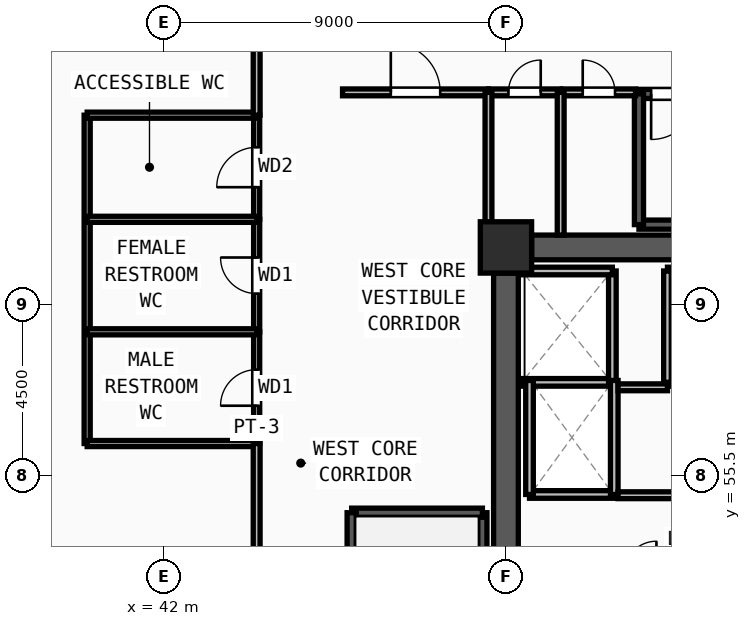
"""IFC4 building model, lengths in metres.
Left out: names, types, materials, properties, quantities, classifications, styles, units other than length and angle.
Written with IfcOpenShell. Run it as: python <this file> out.ifc"""

import sys

from ifc_helpers import new_model, si_unit, direction, frame, frame_2d, origin, origin_2d, place, context, subcontext, project, spatial, rectangle, extrude, source, transform, mapped, element, fill, save


model = new_model("IFC4")
c1 = context("Model", 3, precision=1e-05, world=origin(), true_north=direction((0.0, 1.0)))
c2 = subcontext(c1, "Body", "Model", "MODEL_VIEW")
j1 = project(units=[si_unit("LENGTHUNIT", "METRE"), si_unit("PLANEANGLEUNIT", "RADIAN")], contexts=[c1])
p1 = place(None, origin())
s1 = spatial("IfcSite", under=j1, at=p1, CompositionType="ELEMENT")
p2 = place(p1, origin())
s2 = spatial("IfcBuilding", under=s1, at=p2, CompositionType="ELEMENT")
p3 = place(p2, frame((0.0, 0.0, 213.0)))
s3 = spatial("IfcBuildingStorey", under=s2, at=p3, CompositionType="ELEMENT", Elevation=213.0)
m1 = source(origin(), c2, "Body", "SweptSolid", [
    extrude(rectangle(XDim=1.35, YDim=1.35, at=origin_2d()), origin(), (0.0, 0.0, 1.0), 3.75),
])
p4 = place(p3, frame((51.0, 61.5, 0.0), z_axis=(0.0, 0.0, 1.0), x_axis=(1.0, 0.0, 0.0)))
e1 = element("IfcColumn", 1, at=p4, inside=s3, PredefinedType="COLUMN", context=c2, shape_type="MappedRepresentation", body=[
    mapped(m1, transform((0.0, 0.0, 0.0), x_axis=(1.0, 0.0, 0.0), y_axis=(0.0, 1.0, 0.0), z_axis=(0.0, 0.0, 1.0), scale=1.0)),
])
p5 = place(p3, frame((51.675, 61.5, 0.0), z_axis=(0.0, 0.0, 1.0), x_axis=(1.0, 0.0, 0.0)))
e2 = element("IfcWall", 2, at=p5, inside=s3, PredefinedType="SHEAR", context=c2, shape_type="SweptSolid", body=[
    extrude(rectangle(XDim=7.65, YDim=0.65, at=frame_2d((3.825, 0.0))), origin(), (0.0, 0.0, 1.0), 3.57),
])
p6 = place(p3, frame((51.0, 47.175, 0.0), z_axis=(0.0, 0.0, 1.0), x_axis=(0.0, 1.0, 0.0)))
e3 = element("IfcWall", 3, at=p6, inside=s3, PredefinedType="SHEAR", context=c2, shape_type="SweptSolid", body=[
    extrude(rectangle(XDim=13.65, YDim=0.65, at=frame_2d((6.825, 0.0))), origin(), (0.0, 0.0, 1.0), 3.57),
])
p7 = place(p3, frame((50.38, 46.7, 0.0), z_axis=(0.0, 0.0, 1.0), x_axis=(0.0, 1.0, 0.0)))
e4 = element("IfcWall", 4, at=p7, inside=s3, PredefinedType="SOLIDWALL", context=c2, shape_type="SweptSolid", body=[
    extrude(rectangle(XDim=7.82, YDim=0.24, at=frame_2d((3.91, 0.0))), origin(), (0.0, 0.0, 1.0), 3.57),
])
p8 = place(p3, frame((50.38, 54.52, 0.0), z_axis=(0.0, 0.0, 1.0), x_axis=(-1.0, 0.0, 0.0)))
e5 = element("IfcWall", 5, at=p8, inside=s3, PredefinedType="SOLIDWALL", context=c2, shape_type="SweptSolid", body=[
    extrude(rectangle(XDim=3.44, YDim=0.24, at=frame_2d((1.72, 0.0))), origin(), (0.0, 0.0, 1.0), 3.57),
])
p9 = place(p3, frame((46.94, 54.52, 0.0), z_axis=(0.0, 0.0, 1.0), x_axis=(0.0, -1.0, 0.0)))
e6 = element("IfcWall", 6, at=p9, inside=s3, PredefinedType="SOLIDWALL", context=c2, shape_type="SweptSolid", body=[
    extrude(rectangle(XDim=7.82, YDim=0.24, at=frame_2d((3.91, 0.0))), origin(), (0.0, 0.0, 1.0), 3.57),
])
m2 = source(origin(), c2, "Body", "SweptSolid", [
    extrude(rectangle(XDim=1.2, YDim=2.2, at=frame_2d((0.6, 1.1))), frame((0.0, 0.13, 0.0), z_axis=(0.0, -1.0, 0.0), x_axis=(1.0, 0.0, 0.0)), (0.0, 0.0, 1.0), 0.26),
])
p10 = place(p9, frame((6.3, 0.0, 0.0)))
e7 = element("IfcOpeningElement", 7, at=p10, cuts=e6, PredefinedType="OPENING", context=c2, shape_type="MappedRepresentation", body=[
    mapped(m2, transform((0.0, 0.0, 0.0), x_axis=(1.0, 0.0, 0.0), y_axis=(0.0, 1.0, 0.0), z_axis=(0.0, 0.0, 1.0), scale=1.0)),
])
p11 = place(p3, frame((54.5, 62.1, 0.0), z_axis=(0.0, 0.0, 1.0), x_axis=(1.0, 0.0, 0.0)))
e8 = element("IfcWall", 8, at=p11, inside=s3, PredefinedType="SOLIDWALL", context=c2, shape_type="SweptSolid", body=[
    extrude(rectangle(XDim=7.82, YDim=0.24, at=frame_2d((3.91, 0.0))), origin(), (0.0, 0.0, 1.0), 3.57),
])
p12 = place(p3, frame((62.32, 65.54, 0.0), z_axis=(0.0, 0.0, 1.0), x_axis=(-1.0, 0.0, 0.0)))
e9 = element("IfcWall", 9, at=p12, inside=s3, PredefinedType="SOLIDWALL", context=c2, shape_type="SweptSolid", body=[
    extrude(rectangle(XDim=7.82, YDim=0.24, at=frame_2d((3.91, 0.0))), origin(), (0.0, 0.0, 1.0), 3.57),
])
p13 = place(p12, frame((6.3, 0.0, 0.0)))
e10 = element("IfcOpeningElement", 10, at=p13, cuts=e9, PredefinedType="OPENING", context=c2, shape_type="MappedRepresentation", body=[
    mapped(m2, transform((0.0, 0.0, 0.0), x_axis=(1.0, 0.0, 0.0), y_axis=(0.0, 1.0, 0.0), z_axis=(0.0, 0.0, 1.0), scale=1.0)),
])
p14 = place(p3, frame((54.5, 65.54, 0.0), z_axis=(0.0, 0.0, 1.0), x_axis=(0.0, -1.0, 0.0)))
e11 = element("IfcWall", 11, at=p14, inside=s3, PredefinedType="SOLIDWALL", context=c2, shape_type="SweptSolid", body=[
    extrude(rectangle(XDim=3.44, YDim=0.24, at=frame_2d((1.72, 0.0))), origin(), (0.0, 0.0, 1.0), 3.57),
])
for number, where, z_axis, x_axis in (
    (12, (55.25, 57.95, 0.0), (0.0, 0.0, 1.0), (1.0, 0.0, 0.0)),
    (13, (57.65, 60.88, 0.0), (0.0, 0.0, 1.0), (-1.0, 0.0, 0.0)),
):
    element("IfcWall", number, at=place(p3, frame(where, z_axis=z_axis, x_axis=x_axis)), inside=s3, PredefinedType="SOLIDWALL", context=c2, shape_type="SweptSolid", body=[
        extrude(rectangle(XDim=2.4, YDim=0.2, at=frame_2d((1.2, 0.0))), origin(), (0.0, 0.0, 1.0), 3.57),
    ])
p15 = place(p3, frame((55.25, 60.88, 0.0), z_axis=(0.0, 0.0, 1.0), x_axis=(0.0, -1.0, 0.0)))
e14 = element("IfcWall", 14, at=p15, inside=s3, PredefinedType="SOLIDWALL", context=c2, shape_type="SweptSolid", body=[
    extrude(rectangle(XDim=2.93, YDim=0.2, at=frame_2d((1.465, 0.0))), origin(), (0.0, 0.0, 1.0), 3.57),
])
p16 = place(p3, frame((51.4, 57.95, 0.0), z_axis=(0.0, 0.0, 1.0), x_axis=(1.0, 0.0, 0.0)))
e15 = element("IfcWall", 15, at=p16, inside=s3, PredefinedType="SOLIDWALL", context=c2, shape_type="SweptSolid", body=[
    extrude(rectangle(XDim=2.4, YDim=0.2, at=frame_2d((1.2, 0.0))), origin(), (0.0, 0.0, 1.0), 3.57),
])
p17 = place(p3, frame((53.8, 57.95, 0.0), z_axis=(0.0, 0.0, 1.0), x_axis=(0.0, 1.0, 0.0)))
e16 = element("IfcWall", 16, at=p17, inside=s3, PredefinedType="SOLIDWALL", context=c2, shape_type="SweptSolid", body=[
    extrude(rectangle(XDim=2.93, YDim=0.2, at=frame_2d((1.465, 0.0))), origin(), (0.0, 0.0, 1.0), 3.57),
])
p18 = place(p3, frame((53.8, 60.88, 0.0), z_axis=(0.0, 0.0, 1.0), x_axis=(-1.0, 0.0, 0.0)))
e17 = element("IfcWall", 17, at=p18, inside=s3, PredefinedType="SOLIDWALL", context=c2, shape_type="SweptSolid", body=[
    extrude(rectangle(XDim=2.4, YDim=0.2, at=frame_2d((1.2, 0.0))), origin(), (0.0, 0.0, 1.0), 3.57),
])
p19 = place(p3, frame((51.62, 55.0, 0.0), z_axis=(0.0, 0.0, 1.0), x_axis=(1.0, 0.0, 0.0)))
e18 = element("IfcWall", 18, at=p19, inside=s3, PredefinedType="SOLIDWALL", context=c2, shape_type="SweptSolid", body=[
    extrude(rectangle(XDim=2.23, YDim=0.2, at=frame_2d((1.115, 0.0))), origin(), (0.0, 0.0, 1.0), 3.57),
])
for number, where, z_axis, x_axis in (
    (19, (53.85, 55.0, 0.0), (0.0, 0.0, 1.0), (0.0, 1.0, 0.0)),
    (20, (51.62, 58.0, 0.0), (0.0, 0.0, 1.0), (0.0, -1.0, 0.0)),
):
    element("IfcWall", number, at=place(p3, frame(where, z_axis=z_axis, x_axis=x_axis)), inside=s3, PredefinedType="SOLIDWALL", context=c2, shape_type="SweptSolid", body=[
        extrude(rectangle(XDim=3.0, YDim=0.2, at=frame_2d((1.5, 0.0))), origin(), (0.0, 0.0, 1.0), 3.57),
    ])
p20 = place(p3, frame((53.95, 54.98, 0.0), z_axis=(0.0, 0.0, 1.0), x_axis=(1.0, 0.0, 0.0)))
e21 = element("IfcWall", 21, at=p20, inside=s3, PredefinedType="PARTITIONING", context=c2, shape_type="SweptSolid", body=[
    extrude(rectangle(XDim=4.21, YDim=0.18, at=frame_2d((2.105, 0.0))), origin(), (0.0, 0.0, 1.0), 3.57),
])
m3 = source(origin(), c2, "Body", "SweptSolid", [
    extrude(rectangle(XDim=1.0, YDim=2.2, at=frame_2d((0.5, 1.1))), frame((0.0, 0.1, 0.0), z_axis=(0.0, -1.0, 0.0), x_axis=(1.0, 0.0, 0.0)), (0.0, 0.0, 1.0), 0.2),
])
p21 = place(p20, frame((1.6, 0.0, 0.0)))
e22 = element("IfcOpeningElement", 22, at=p21, cuts=e21, PredefinedType="OPENING", context=c2, shape_type="MappedRepresentation", body=[
    mapped(m3, transform((0.0, 0.0, 0.0), x_axis=(1.0, 0.0, 0.0), y_axis=(0.0, 1.0, 0.0), z_axis=(0.0, 0.0, 1.0), scale=1.0)),
])
p22 = place(p3, frame((44.44, 56.34, 0.0), z_axis=(0.0, 0.0, 1.0), x_axis=(0.0, 1.0, 0.0)))
e23 = element("IfcWall", 23, at=p22, inside=s3, PredefinedType="PARTITIONING", context=c2, shape_type="SweptSolid", body=[
    extrude(rectangle(XDim=2.94, YDim=0.16, at=frame_2d((1.47, 0.0))), origin(), (0.0, 0.0, 1.0), 3.57),
])
m4 = source(origin(), c2, "Body", "SweptSolid", [
    extrude(rectangle(XDim=0.95, YDim=2.15, at=frame_2d((0.475, 1.075))), frame((0.0, 0.09, 0.0), z_axis=(0.0, -1.0, 0.0), x_axis=(1.0, 0.0, 0.0)), (0.0, 0.0, 1.0), 0.18),
])
p23 = place(p22, frame((0.995, 0.0, 0.0)))
e24 = element("IfcOpeningElement", 24, at=p23, cuts=e23, PredefinedType="OPENING", context=c2, shape_type="MappedRepresentation", body=[
    mapped(m4, transform((0.0, 0.0, 0.0), x_axis=(1.0, 0.0, 0.0), y_axis=(0.0, 1.0, 0.0), z_axis=(0.0, 0.0, 1.0), scale=1.0)),
])
p24 = place(p3, frame((44.44, 59.28, 0.0), z_axis=(0.0, 0.0, 1.0), x_axis=(0.0, 1.0, 0.0)))
e25 = element("IfcWall", 25, at=p24, inside=s3, PredefinedType="PARTITIONING", context=c2, shape_type="SweptSolid", body=[
    extrude(rectangle(XDim=2.96, YDim=0.16, at=frame_2d((1.48, 0.0))), origin(), (0.0, 0.0, 1.0), 3.57),
])
p25 = place(p24, frame((1.005, 0.0, 0.0)))
e26 = element("IfcOpeningElement", 26, at=p25, cuts=e25, PredefinedType="OPENING", context=c2, shape_type="MappedRepresentation", body=[
    mapped(m4, transform((0.0, 0.0, 0.0), x_axis=(1.0, 0.0, 0.0), y_axis=(0.0, 1.0, 0.0), z_axis=(0.0, 0.0, 1.0), scale=1.0)),
])
p26 = place(p3, frame((44.44, 62.24, 0.0), z_axis=(0.0, 0.0, 1.0), x_axis=(0.0, 1.0, 0.0)))
e27 = element("IfcWall", 27, at=p26, inside=s3, PredefinedType="PARTITIONING", context=c2, shape_type="SweptSolid", body=[
    extrude(rectangle(XDim=2.74, YDim=0.16, at=frame_2d((1.37, 0.0))), origin(), (0.0, 0.0, 1.0), 3.57),
])
m5 = source(origin(), c2, "Body", "SweptSolid", [
    extrude(rectangle(XDim=1.05, YDim=2.15, at=frame_2d((0.525, 1.075))), frame((0.0, 0.09, 0.0), z_axis=(0.0, -1.0, 0.0), x_axis=(1.0, 0.0, 0.0)), (0.0, 0.0, 1.0), 0.18),
])
p27 = place(p26, frame((0.845, 0.0, 0.0)))
e28 = element("IfcOpeningElement", 28, at=p27, cuts=e27, PredefinedType="OPENING", context=c2, shape_type="MappedRepresentation", body=[
    mapped(m5, transform((0.0, 0.0, 0.0), x_axis=(1.0, 0.0, 0.0), y_axis=(0.0, 1.0, 0.0), z_axis=(0.0, 0.0, 1.0), scale=1.0)),
])
p28 = place(p3, frame((50.54, 65.58, 0.0), z_axis=(0.0, 0.0, 1.0), x_axis=(1.0, 0.0, 0.0)))
e29 = element("IfcWall", 29, at=p28, inside=s3, PredefinedType="PARTITIONING", context=c2, shape_type="SweptSolid", body=[
    extrude(rectangle(XDim=1.9, YDim=0.18, at=frame_2d((0.95, 0.0))), origin(), (0.0, 0.0, 1.0), 3.57),
])
m6 = source(origin(), c2, "Body", "SweptSolid", [
    extrude(rectangle(XDim=0.85, YDim=2.1, at=frame_2d((0.425, 1.05))), frame((0.0, 0.1, 0.0), z_axis=(0.0, -1.0, 0.0), x_axis=(1.0, 0.0, 0.0)), (0.0, 0.0, 1.0), 0.2),
])
p29 = place(p28, frame((0.525, 0.0, 0.0)))
e30 = element("IfcOpeningElement", 30, at=p29, cuts=e29, PredefinedType="OPENING", context=c2, shape_type="MappedRepresentation", body=[
    mapped(m6, transform((0.0, 0.0, 0.0), x_axis=(1.0, 0.0, 0.0), y_axis=(0.0, 1.0, 0.0), z_axis=(0.0, 0.0, 1.0), scale=1.0)),
])
p30 = place(p3, frame((52.48, 65.58, 0.0), z_axis=(0.0, 0.0, 1.0), x_axis=(1.0, 0.0, 0.0)))
e31 = element("IfcWall", 31, at=p30, inside=s3, PredefinedType="PARTITIONING", context=c2, shape_type="SweptSolid", body=[
    extrude(rectangle(XDim=1.93, YDim=0.18, at=frame_2d((0.965, 0.0))), origin(), (0.0, 0.0, 1.0), 3.57),
])
p31 = place(p30, frame((0.54, 0.0, 0.0)))
e32 = element("IfcOpeningElement", 32, at=p31, cuts=e31, PredefinedType="OPENING", context=c2, shape_type="MappedRepresentation", body=[
    mapped(m6, transform((0.0, 0.0, 0.0), x_axis=(1.0, 0.0, 0.0), y_axis=(0.0, 1.0, 0.0), z_axis=(0.0, 0.0, 1.0), scale=1.0)),
])
p32 = place(p3, frame((46.7, 65.58, 0.0), z_axis=(0.0, 0.0, 1.0), x_axis=(1.0, 0.0, 0.0)))
e33 = element("IfcWall", 33, at=p32, inside=s3, PredefinedType="PARTITIONING", context=c2, shape_type="SweptSolid", body=[
    extrude(rectangle(XDim=3.84, YDim=0.18, at=frame_2d((1.92, 0.0))), origin(), (0.0, 0.0, 1.0), 3.57),
])
m7 = source(origin(), c2, "Body", "SweptSolid", [
    extrude(rectangle(XDim=1.3, YDim=2.2, at=frame_2d((0.65, 1.1))), frame((0.0, 0.1, 0.0), z_axis=(0.0, -1.0, 0.0), x_axis=(1.0, 0.0, 0.0)), (0.0, 0.0, 1.0), 0.2),
])
p33 = place(p32, frame((1.27, 0.0, 0.0)))
e34 = element("IfcOpeningElement", 34, at=p33, cuts=e33, PredefinedType="OPENING", context=c2, shape_type="MappedRepresentation", body=[
    mapped(m7, transform((0.0, 0.0, 0.0), x_axis=(1.0, 0.0, 0.0), y_axis=(0.0, 1.0, 0.0), z_axis=(0.0, 0.0, 1.0), scale=1.0)),
])
p34 = place(p3, frame((39.98, 56.34, 0.0), z_axis=(0.0, 0.0, 1.0), x_axis=(0.0, 1.0, 0.0)))
e35 = element("IfcWall", 35, at=p34, inside=s3, PredefinedType="PARTITIONING", context=c2, shape_type="SweptSolid", body=[
    extrude(rectangle(XDim=8.64, YDim=0.16, at=frame_2d((4.32, 0.0))), origin(), (0.0, 0.0, 1.0), 3.57),
])
for number, where, z_axis, x_axis in (
    (36, (39.98, 56.34, 0.0), (0.0, 0.0, 1.0), (1.0, 0.0, 0.0)),
    (37, (39.98, 59.28, 0.0), (0.0, 0.0, 1.0), (1.0, 0.0, 0.0)),
    (38, (39.98, 62.24, 0.0), (0.0, 0.0, 1.0), (1.0, 0.0, 0.0)),
    (39, (39.98, 64.98, 0.0), (0.0, 0.0, 1.0), (1.0, 0.0, 0.0)),
):
    element("IfcWall", number, at=place(p3, frame(where, z_axis=z_axis, x_axis=x_axis)), inside=s3, PredefinedType="PARTITIONING", context=c2, shape_type="SweptSolid", body=[
        extrude(rectangle(XDim=4.46, YDim=0.16, at=frame_2d((2.23, 0.0))), origin(), (0.0, 0.0, 1.0), 3.57),
    ])
p35 = place(p3, frame((50.54, 61.95, 0.0), z_axis=(0.0, 0.0, 1.0), x_axis=(0.0, 1.0, 0.0)))
e40 = element("IfcWall", 40, at=p35, inside=s3, PredefinedType="PARTITIONING", context=c2, shape_type="SweptSolid", body=[
    extrude(rectangle(XDim=3.63, YDim=0.18, at=frame_2d((1.815, 0.0))), origin(), (0.0, 0.0, 1.0), 3.57),
])
p36 = place(p3, frame((52.44, 61.825, 0.0), z_axis=(0.0, 0.0, 1.0), x_axis=(0.0, 1.0, 0.0)))
e41 = element("IfcWall", 41, at=p36, inside=s3, PredefinedType="PARTITIONING", context=c2, shape_type="SweptSolid", body=[
    extrude(rectangle(XDim=3.755, YDim=0.18, at=frame_2d((1.877, 0.0))), origin(), (0.0, 0.0, 1.0), 3.57),
])
p37 = place(p3, frame((44.44, 50.39, 0.0), z_axis=(0.0, 0.0, 1.0), x_axis=(0.0, 1.0, 0.0)))
e42 = element("IfcWall", 42, at=p37, inside=s3, PredefinedType="PARTITIONING", context=c2, shape_type="SweptSolid", body=[
    extrude(rectangle(XDim=5.95, YDim=0.18, at=frame_2d((2.975, 0.0))), origin(), (0.0, 0.0, 1.0), 3.57),
])
p38 = place(p3, frame((44.44, 64.98, 0.0), z_axis=(0.0, 0.0, 1.0), x_axis=(0.0, 1.0, 0.0)))
e43 = element("IfcWall", 43, at=p38, inside=s3, PredefinedType="PARTITIONING", context=c2, shape_type="SweptSolid", body=[
    extrude(rectangle(XDim=1.805, YDim=0.18, at=frame_2d((0.902, 0.0))), origin(), (0.0, 0.0, 1.0), 3.57),
])
p39 = place(p3, frame((53.95, 57.82, 0.0), z_axis=(0.0, 0.0, 1.0), x_axis=(1.0, 0.0, 0.0)))
e44 = element("IfcWall", 44, at=p39, inside=s3, PredefinedType="PARTITIONING", context=c2, shape_type="SweptSolid", body=[
    extrude(rectangle(XDim=1.3, YDim=0.18, at=frame_2d((0.65, 0.0))), origin(), (0.0, 0.0, 1.0), 3.57),
])
m8 = source(origin(), c2, "Body", "SweptSolid", [
    extrude(rectangle(XDim=1.2, YDim=2.2, at=frame_2d((0.6, 1.1))), frame((0.0, 0.025, 0.0), z_axis=(0.0, -1.0, 0.0), x_axis=(1.0, 0.0, 0.0)), (0.0, 0.0, 1.0), 0.05),
])
p40 = place(p13, origin())
e45 = element("IfcDoor", 45, at=p40, inside=s3, OperationType="SINGLE_SWING_RIGHT", PredefinedType="DOOR", context=c2, shape_type="MappedRepresentation", body=[
    mapped(m8, transform((0.0, 0.0, 0.0), x_axis=(1.0, 0.0, 0.0), y_axis=(0.0, 1.0, 0.0), z_axis=(0.0, 0.0, 1.0), scale=1.0)),
])
fill(e10, e45)
m9 = source(origin(), c2, "Body", "SweptSolid", [
    extrude(rectangle(XDim=0.95, YDim=2.15, at=frame_2d((0.475, 1.075))), frame((0.0, 0.025, 0.0), z_axis=(0.0, -1.0, 0.0), x_axis=(1.0, 0.0, 0.0)), (0.0, 0.0, 1.0), 0.05),
])
p41 = place(p23, origin())
e46 = element("IfcDoor", 46, at=p41, inside=s3, OperationType="SINGLE_SWING_LEFT", PredefinedType="DOOR", context=c2, shape_type="MappedRepresentation", body=[
    mapped(m9, transform((0.0, 0.0, 0.0), x_axis=(1.0, 0.0, 0.0), y_axis=(0.0, 1.0, 0.0), z_axis=(0.0, 0.0, 1.0), scale=1.0)),
])
fill(e24, e46)
p42 = place(p25, origin())
e47 = element("IfcDoor", 47, at=p42, inside=s3, OperationType="SINGLE_SWING_RIGHT", PredefinedType="DOOR", context=c2, shape_type="MappedRepresentation", body=[
    mapped(m9, transform((0.0, 0.0, 0.0), x_axis=(1.0, 0.0, 0.0), y_axis=(0.0, 1.0, 0.0), z_axis=(0.0, 0.0, 1.0), scale=1.0)),
])
fill(e26, e47)
m10 = source(origin(), c2, "Body", "SweptSolid", [
    extrude(rectangle(XDim=1.05, YDim=2.15, at=frame_2d((0.525, 1.075))), frame((0.0, 0.025, 0.0), z_axis=(0.0, -1.0, 0.0), x_axis=(1.0, 0.0, 0.0)), (0.0, 0.0, 1.0), 0.05),
])
p43 = place(p27, origin())
e48 = element("IfcDoor", 48, at=p43, inside=s3, OperationType="SINGLE_SWING_LEFT", PredefinedType="DOOR", context=c2, shape_type="MappedRepresentation", body=[
    mapped(m10, transform((0.0, 0.0, 0.0), x_axis=(1.0, 0.0, 0.0), y_axis=(0.0, 1.0, 0.0), z_axis=(0.0, 0.0, 1.0), scale=1.0)),
])
fill(e28, e48)
m11 = source(origin(), c2, "Body", "SweptSolid", [
    extrude(rectangle(XDim=0.85, YDim=2.1, at=frame_2d((0.425, 1.05))), frame((0.0, 0.025, 0.0), z_axis=(0.0, -1.0, 0.0), x_axis=(1.0, 0.0, 0.0)), (0.0, 0.0, 1.0), 0.05),
])
p44 = place(p29, origin())
e49 = element("IfcDoor", 49, at=p44, inside=s3, OperationType="SINGLE_SWING_RIGHT", PredefinedType="DOOR", context=c2, shape_type="MappedRepresentation", body=[
    mapped(m11, transform((0.0, 0.0, 0.0), x_axis=(1.0, 0.0, 0.0), y_axis=(0.0, 1.0, 0.0), z_axis=(0.0, 0.0, 1.0), scale=1.0)),
])
fill(e30, e49)
p45 = place(p31, origin())
e50 = element("IfcDoor", 50, at=p45, inside=s3, OperationType="SINGLE_SWING_LEFT", PredefinedType="DOOR", context=c2, shape_type="MappedRepresentation", body=[
    mapped(m11, transform((0.0, 0.0, 0.0), x_axis=(1.0, 0.0, 0.0), y_axis=(0.0, 1.0, 0.0), z_axis=(0.0, 0.0, 1.0), scale=1.0)),
])
fill(e32, e50)
m12 = source(origin(), c2, "Body", "SweptSolid", [
    extrude(rectangle(XDim=1.3, YDim=2.2, at=frame_2d((0.65, 1.1))), frame((0.0, 0.025, 0.0), z_axis=(0.0, -1.0, 0.0), x_axis=(1.0, 0.0, 0.0)), (0.0, 0.0, 1.0), 0.05),
])
p46 = place(p33, origin())
e51 = element("IfcDoor", 51, at=p46, inside=s3, OperationType="SINGLE_SWING_LEFT", PredefinedType="DOOR", context=c2, shape_type="MappedRepresentation", body=[
    mapped(m12, transform((0.0, 0.0, 0.0), x_axis=(1.0, 0.0, 0.0), y_axis=(0.0, 1.0, 0.0), z_axis=(0.0, 0.0, 1.0), scale=1.0)),
])
fill(e34, e51)
save(model, sys.argv[1])
